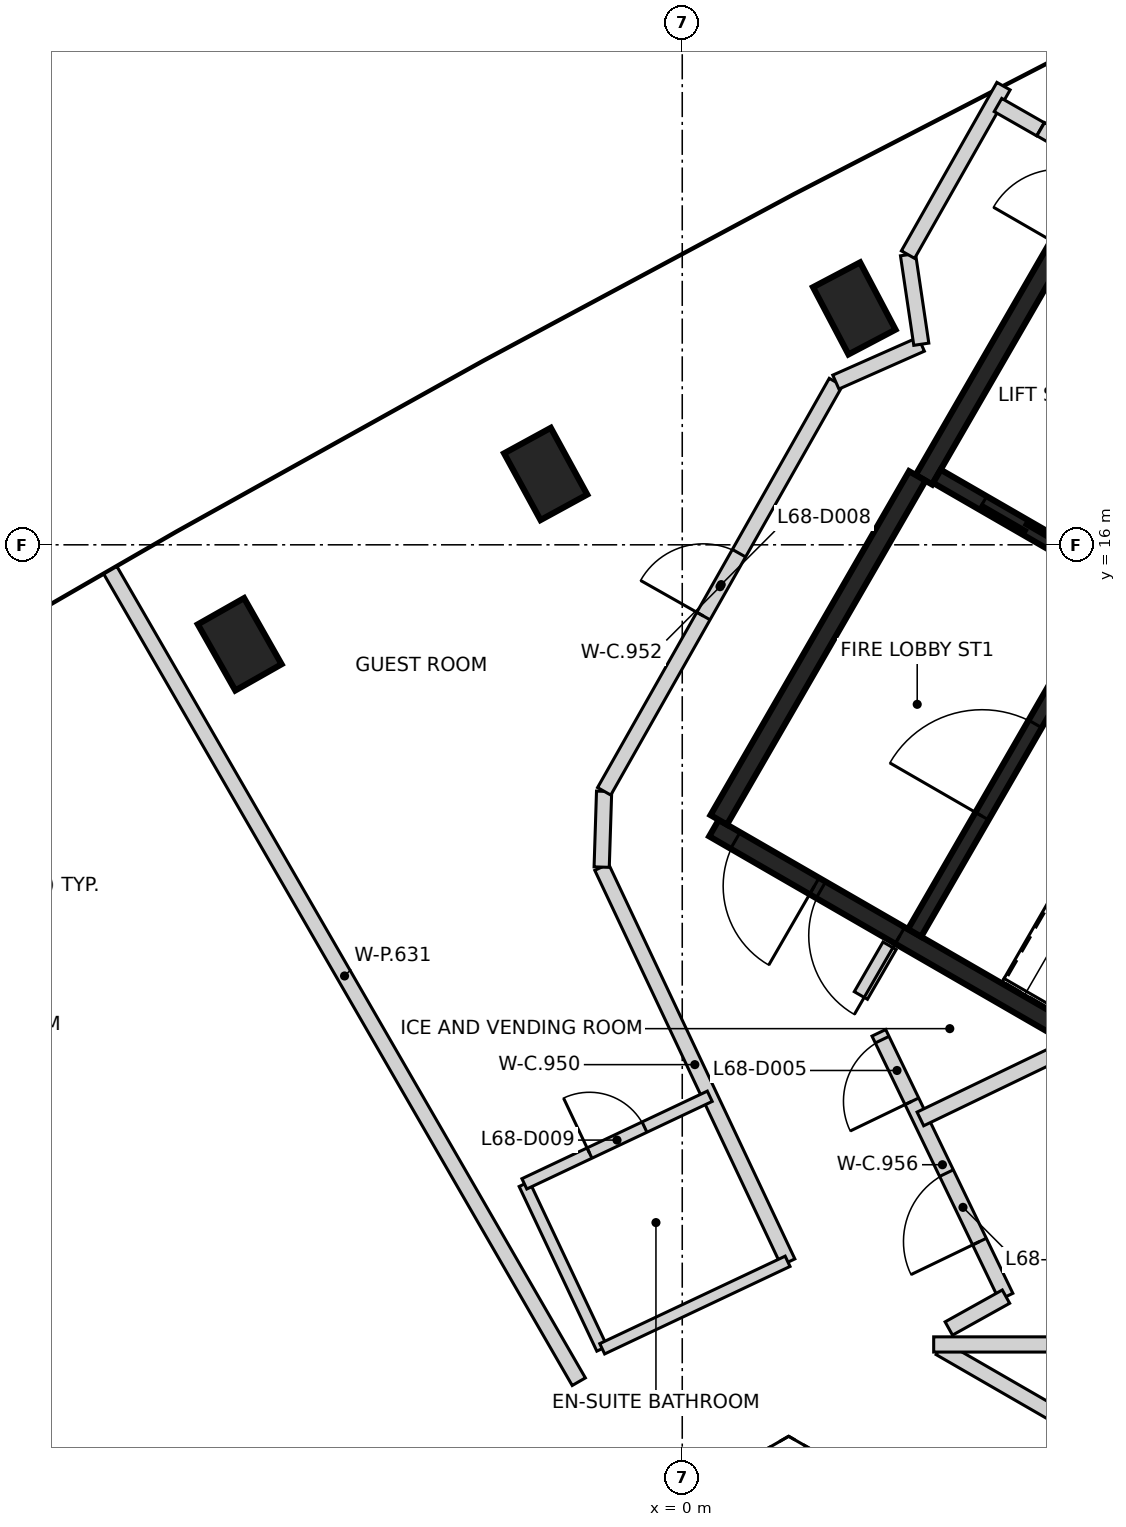
"""IFC4 building model, lengths in metres.
Left out: names, types, materials, properties, quantities, classifications, styles, units other than length and angle.
Written with IfcOpenShell. Run it as: python <this file> out.ifc"""

import sys

from ifc_helpers import new_model, si_unit, direction, frame, frame_2d, origin, origin_2d, place, context, subcontext, project, spatial, rectangle, extrude, element, fill, save


model = new_model("IFC4")
c1 = context("Model", 3, precision=1e-05, world=origin(), true_north=direction((0.0, 1.0)))
c2 = subcontext(c1, "Body", "Model", "MODEL_VIEW")
j1 = project(units=[si_unit("LENGTHUNIT", "METRE"), si_unit("PLANEANGLEUNIT", "RADIAN")], contexts=[c1])
p1 = place(None, origin())
s1 = spatial("IfcSite", under=j1, at=p1, CompositionType="ELEMENT")
p2 = place(p1, origin())
s2 = spatial("IfcBuilding", under=s1, at=p2, CompositionType="ELEMENT")
p3 = place(p2, frame((0.0, 0.0, 269.4)))
s3 = spatial("IfcBuildingStorey", under=s2, at=p3, CompositionType="ELEMENT", Elevation=269.4)
for number, where, z_axis, x_axis in (
    (1, (2.263, 19.11, -0.35), (0.0, 0.0, 1.0), (-0.466, 0.885, 0.0)),
    (2, (-1.797, 16.932, -0.35), (0.0, 0.0, 1.0), (-0.479, 0.878, 0.0)),
    (3, (-5.822, 14.691, -0.35), (0.0, 0.0, 1.0), (-0.493, 0.87, 0.0)),
):
    element("IfcColumn", number, at=place(p3, frame(where, z_axis=z_axis, x_axis=x_axis)), inside=s3, PredefinedType="COLUMN", context=c2, shape_type="SweptSolid", body=[
        extrude(rectangle(XDim=1.0, YDim=0.7, at=origin_2d()), origin(), (0.0, 0.0, 1.0), 3.6),
    ])
p4 = place(p3, frame((10.42, 6.498, 0.0), z_axis=(0.0, 0.0, 1.0), x_axis=(-0.866021906294, 0.500006057782, 0.0)))
e4 = element("IfcWall", 4, at=p4, inside=s3, PredefinedType="SHEAR", context=c2, shape_type="SweptSolid", body=[
    extrude(rectangle(XDim=11.55, YDim=0.25, at=frame_2d((5.775, 0.0))), origin(), (0.0, 0.0, 1.0), 3.25),
])
p5 = place(p4, frame((10.025, 0.0, 0.0)))
e5 = element("IfcOpeningElement", 5, at=p5, cuts=e4, PredefinedType="OPENING", context=c2, shape_type="SweptSolid", body=[
    extrude(rectangle(XDim=1.2, YDim=2.1, at=frame_2d((0.6, 1.05))), frame((0.0, 0.135, 0.0), z_axis=(0.0, -1.0, 0.0), x_axis=(1.0, 0.0, 0.0)), (0.0, 0.0, 1.0), 0.27),
])
p6 = place(p4, frame((8.725, 0.0, 0.0)))
e6 = element("IfcOpeningElement", 6, at=p6, cuts=e4, PredefinedType="OPENING", context=c2, shape_type="SweptSolid", body=[
    extrude(rectangle(XDim=1.2, YDim=2.1, at=frame_2d((0.6, 1.05))), frame((0.0, 0.135, 0.0), z_axis=(0.0, -1.0, 0.0), x_axis=(1.0, 0.0, 0.0)), (0.0, 0.0, 1.0), 0.27),
])
p7 = place(p3, frame((3.179, 16.856, 0.0), z_axis=(0.0, 0.0, 1.0), x_axis=(0.500001955336, 0.866024274868, 0.0)))
e7 = element("IfcWall", 7, at=p7, inside=s3, PredefinedType="SHEAR", context=c2, shape_type="SweptSolid", body=[
    extrude(rectangle(XDim=6.125, YDim=0.25, at=frame_2d((3.062, 0.0))), origin(), (0.0, 0.0, 1.0), 3.25),
])
p8 = place(p7, frame((3.563, 0.0, 0.0)))
e8 = element("IfcOpeningElement", 8, at=p8, cuts=e7, PredefinedType="OPENING", context=c2, shape_type="SweptSolid", body=[
    extrude(rectangle(XDim=1.0, YDim=2.1, at=frame_2d((0.5, 1.05))), frame((0.0, 0.135, 0.0), z_axis=(0.0, -1.0, 0.0), x_axis=(1.0, 0.0, 0.0)), (0.0, 0.0, 1.0), 0.27),
])
p9 = place(p3, frame((0.48, 12.381, 0.0), z_axis=(0.0, 0.0, 1.0), x_axis=(0.49999885962, 0.866026062182, 0.0)))
e9 = element("IfcWall", 9, at=p9, inside=s3, PredefinedType="SHEAR", context=c2, shape_type="SweptSolid", body=[
    extrude(rectangle(XDim=5.225, YDim=0.25, at=frame_2d((2.612, 0.0))), origin(), (0.0, 0.0, 1.0), 3.25),
])
p10 = place(p3, frame((3.057, 10.895, 0.0), z_axis=(0.0, 0.0, 1.0), x_axis=(0.500027839223, 0.866009330205, 0.0)))
e10 = element("IfcWall", 10, at=p10, inside=s3, PredefinedType="SHEAR", context=c2, shape_type="SweptSolid", body=[
    extrude(rectangle(XDim=5.098, YDim=0.2, at=frame_2d((2.549, 0.0))), origin(), (0.0, 0.0, 1.0), 3.25),
])
p11 = place(p10, frame((1.774, 0.0, 0.0)))
e11 = element("IfcOpeningElement", 11, at=p11, cuts=e10, PredefinedType="OPENING", context=c2, shape_type="SweptSolid", body=[
    extrude(rectangle(XDim=1.4, YDim=2.1, at=frame_2d((0.7, 1.05))), frame((0.0, 0.11, 0.0), z_axis=(0.0, -1.0, 0.0), x_axis=(1.0, 0.0, 0.0)), (0.0, 0.0, 1.0), 0.22),
])
p12 = place(p3, frame((5.646, 15.576, 0.0), z_axis=(0.0, 0.0, 1.0), x_axis=(-0.866018407898, 0.500012117035, 0.0)))
e12 = element("IfcWall", 12, at=p12, inside=s3, PredefinedType="SHEAR", context=c2, shape_type="SweptSolid", body=[
    extrude(rectangle(XDim=2.651, YDim=0.2, at=frame_2d((1.325, 0.0))), origin(), (0.0, 0.0, 1.0), 3.25),
])
p13 = place(p12, frame((0.652, 0.0, 0.0)))
e13 = element("IfcOpeningElement", 13, at=p13, cuts=e12, PredefinedType="OPENING", context=c2, shape_type="SweptSolid", body=[
    extrude(rectangle(XDim=1.3, YDim=2.1, at=frame_2d((0.65, 1.05))), frame((0.0, 0.11, 0.0), z_axis=(0.0, -1.0, 0.0), x_axis=(1.0, 0.0, 0.0)), (0.0, 0.0, 1.0), 0.22),
])
p14 = place(p3, frame((-1.06, 11.76, 0.0), z_axis=(0.0, 0.0, 1.0), x_axis=(0.426549824954, -0.904464066081, 0.0)))
e14 = element("IfcWall", 14, at=p14, inside=s3, PredefinedType="PARTITIONING", context=c2, shape_type="SweptSolid", body=[
    extrude(rectangle(XDim=5.747, YDim=0.2, at=frame_2d((2.873, 0.0))), origin(), (0.0, 0.0, 1.0), 3.25),
])
p15 = place(p3, frame((-1.06, 11.76, 0.0), z_axis=(0.0, 0.0, 1.0), x_axis=(0.032059906789, 0.999485949064, 0.0)))
e15 = element("IfcWall", 15, at=p15, inside=s3, PredefinedType="PARTITIONING", context=c2, shape_type="SweptSolid", body=[
    extrude(rectangle(XDim=0.998, YDim=0.2, at=frame_2d((0.499, 0.0))), origin(), (0.0, 0.0, 1.0), 3.25),
])
p16 = place(p3, frame((-1.027, 12.757, 0.0), z_axis=(0.0, 0.0, 1.0), x_axis=(0.492663063759, 0.870220147783, 0.0)))
e16 = element("IfcWall", 16, at=p16, inside=s3, PredefinedType="PARTITIONING", context=c2, shape_type="SweptSolid", body=[
    extrude(rectangle(XDim=6.187, YDim=0.2, at=frame_2d((3.094, 0.0))), origin(), (0.0, 0.0, 1.0), 3.25),
])
p17 = place(p16, frame((2.65, 0.0, 0.0)))
e17 = element("IfcOpeningElement", 17, at=p17, cuts=e16, PredefinedType="OPENING", context=c2, shape_type="SweptSolid", body=[
    extrude(rectangle(XDim=0.95, YDim=2.1, at=frame_2d((0.475, 1.05))), frame((0.0, 0.11, 0.0), z_axis=(0.0, -1.0, 0.0), x_axis=(1.0, 0.0, 0.0)), (0.0, 0.0, 1.0), 0.22),
])
p18 = place(p3, frame((2.021, 18.141, 0.0), z_axis=(0.0, 0.0, 1.0), x_axis=(0.914343087003, 0.404940389748, 0.0)))
e18 = element("IfcWall", 18, at=p18, inside=s3, PredefinedType="PARTITIONING", context=c2, shape_type="SweptSolid", body=[
    extrude(rectangle(XDim=1.229, YDim=0.2, at=frame_2d((0.615, 0.0))), origin(), (0.0, 0.0, 1.0), 3.25),
])
p19 = place(p3, frame((2.35, 10.071, 0.0), z_axis=(0.0, 0.0, 1.0), x_axis=(0.500309905322, 0.865846405916, 0.0)))
e19 = element("IfcWall", 19, at=p19, inside=s3, PredefinedType="PARTITIONING", context=c2, shape_type="SweptSolid", body=[
    extrude(rectangle(XDim=0.755, YDim=0.2, at=frame_2d((0.378, 0.0))), origin(), (0.0, 0.0, 1.0), 3.25),
])
p20 = place(p3, frame((4.26, 6.109, 0.0), z_axis=(0.0, 0.0, 1.0), x_axis=(-0.434189007872, 0.900821794498, 0.0)))
e20 = element("IfcWall", 20, at=p20, inside=s3, PredefinedType="PARTITIONING", context=c2, shape_type="SweptSolid", body=[
    extrude(rectangle(XDim=3.853, YDim=0.2, at=frame_2d((1.926, 0.0))), origin(), (0.0, 0.0, 1.0), 3.25),
])
p21 = place(p20, frame((2.853, 0.0, 0.0)))
e21 = element("IfcOpeningElement", 21, at=p21, cuts=e20, PredefinedType="OPENING", context=c2, shape_type="SweptSolid", body=[
    extrude(rectangle(XDim=0.9, YDim=2.1, at=frame_2d((0.45, 1.05))), frame((0.0, 0.11, 0.0), z_axis=(0.0, -1.0, 0.0), x_axis=(1.0, 0.0, 0.0)), (0.0, 0.0, 1.0), 0.22),
])
p22 = place(p20, frame((0.804, 0.0, 0.0)))
e22 = element("IfcOpeningElement", 22, at=p22, cuts=e20, PredefinedType="OPENING", context=c2, shape_type="SweptSolid", body=[
    extrude(rectangle(XDim=1.0, YDim=2.1, at=frame_2d((0.5, 1.05))), frame((0.0, 0.11, 0.0), z_axis=(0.0, -1.0, 0.0), x_axis=(1.0, 0.0, 0.0)), (0.0, 0.0, 1.0), 0.22),
])
p23 = place(p3, frame((2.97, 19.817, 0.0), z_axis=(0.0, 0.0, 1.0), x_axis=(0.146986994932, -0.989138424752, 0.0)))
e23 = element("IfcWall", 23, at=p23, inside=s3, PredefinedType="PARTITIONING", context=c2, shape_type="SweptSolid", body=[
    extrude(rectangle(XDim=1.191, YDim=0.2, at=frame_2d((0.595, 0.0))), origin(), (0.0, 0.0, 1.0), 2.35),
])
p24 = place(p3, frame((2.97, 19.818, 0.0), z_axis=(0.0, 0.0, 1.0), x_axis=(0.493215654548, 0.86990707441, 0.0)))
e24 = element("IfcWall", 24, at=p24, inside=s3, PredefinedType="PARTITIONING", context=c2, shape_type="SweptSolid", body=[
    extrude(rectangle(XDim=2.548, YDim=0.2, at=frame_2d((1.274, 0.0))), origin(), (0.0, 0.0, 1.0), 3.25),
])
p25 = place(p3, frame((3.39, 5.433, 0.0), z_axis=(0.0, 0.0, 1.0), x_axis=(0.866117799835, -0.499839931186, 0.0)))
e25 = element("IfcWall", 25, at=p25, inside=s3, PredefinedType="PARTITIONING", context=c2, shape_type="SweptSolid", body=[
    extrude(rectangle(XDim=1.859, YDim=0.2, at=frame_2d((0.929, 0.0))), origin(), (0.0, 0.0, 1.0), 3.25),
])
p26 = place(p3, frame((3.507, 5.69, 0.0), z_axis=(0.0, 0.0, 1.0), x_axis=(0.873567976284, 0.486702158215, 0.0)))
e26 = element("IfcWall", 26, at=p26, inside=s3, PredefinedType="PARTITIONING", context=c2, shape_type="SweptSolid", body=[
    extrude(rectangle(XDim=0.861, YDim=0.2, at=frame_2d((0.43, 0.0))), origin(), (0.0, 0.0, 1.0), 3.25),
])
p27 = place(p3, frame((4.154, 21.786, 0.0), z_axis=(0.0, 0.0, 1.0), x_axis=(0.868196374619, -0.496220772539, 0.0)))
e27 = element("IfcWall", 27, at=p27, inside=s3, PredefinedType="PARTITIONING", context=c2, shape_type="SweptSolid", body=[
    extrude(rectangle(XDim=0.643, YDim=0.2, at=frame_2d((0.321, 0.0))), origin(), (0.0, 0.0, 1.0), 3.25),
])
p28 = place(p3, frame((4.716, 21.468, 0.0), z_axis=(0.0, 0.0, 1.0), x_axis=(0.865912682783, -0.500195187698, 0.0)))
e28 = element("IfcWall", 28, at=p28, inside=s3, PredefinedType="PARTITIONING", context=c2, shape_type="SweptSolid", body=[
    extrude(rectangle(XDim=0.79, YDim=0.2, at=frame_2d((0.395, 0.0))), origin(), (0.0, 0.0, 1.0), 3.25),
])
p29 = place(p3, frame((-7.524, 15.666, 0.0), z_axis=(0.0, 0.0, 1.0), x_axis=(0.499979611936, -0.866037174519, 0.0)))
e29 = element("IfcWall", 29, at=p29, inside=s3, PredefinedType="PARTITIONING", context=c2, shape_type="SweptSolid", body=[
    extrude(rectangle(XDim=12.327, YDim=0.2, at=frame_2d((6.164, 0.0))), origin(), (0.0, 0.0, 1.0), 2.35),
])
p30 = place(p3, frame((3.133, 8.447, 0.0), z_axis=(0.0, 0.0, 1.0), x_axis=(0.900981876458, 0.433856725538, 0.0)))
e30 = element("IfcWall", 30, at=p30, inside=s3, PredefinedType="PARTITIONING", context=c2, shape_type="SweptSolid", body=[
    extrude(rectangle(XDim=2.143, YDim=0.2, at=frame_2d((1.071, 0.0))), origin(), (0.0, 0.0, 1.0), 3.25),
])
p31 = place(p3, frame((3.308, 5.48, 0.0), z_axis=(0.0, 0.0, 1.0), x_axis=(1.0, 0.0, 0.0)))
e31 = element("IfcWall", 31, at=p31, inside=s3, PredefinedType="PARTITIONING", context=c2, shape_type="SweptSolid", body=[
    extrude(rectangle(XDim=13.971, YDim=0.2, at=frame_2d((6.986, 0.0))), origin(), (0.0, 0.0, 1.0), 2.35),
])
p32 = place(p3, frame((-2.078, 7.59, 0.0), z_axis=(0.0, 0.0, 1.0), x_axis=(0.426709924428, -0.904388545037, 0.0)))
e32 = element("IfcWall", 32, at=p32, inside=s3, PredefinedType="PARTITIONING", context=c2, shape_type="SweptSolid", body=[
    extrude(rectangle(XDim=2.395, YDim=0.15, at=frame_2d((1.198, 0.0))), origin(), (0.0, 0.0, 1.0), 3.25),
])
p33 = place(p3, frame((-2.077, 7.593, 0.0), z_axis=(0.0, 0.0, 1.0), x_axis=(0.904196218291, 0.427117312724, 0.0)))
e33 = element("IfcWall", 33, at=p33, inside=s3, PredefinedType="PARTITIONING", context=c2, shape_type="SweptSolid", body=[
    extrude(rectangle(XDim=2.697, YDim=0.15, at=frame_2d((1.349, 0.0))), origin(), (0.0, 0.0, 1.0), 3.25),
])
p34 = place(p33, frame((0.948, 0.0, 0.0)))
e34 = element("IfcOpeningElement", 34, at=p34, cuts=e33, PredefinedType="OPENING", context=c2, shape_type="SweptSolid", body=[
    extrude(rectangle(XDim=0.8, YDim=2.1, at=frame_2d((0.4, 1.05))), frame((0.0, 0.085, 0.0), z_axis=(0.0, -1.0, 0.0), x_axis=(1.0, 0.0, 0.0)), (0.0, 0.0, 1.0), 0.17),
])
p35 = place(p3, frame((-1.053, 5.423, 0.0), z_axis=(0.0, 0.0, 1.0), x_axis=(0.904370950432, 0.426747213247, 0.0)))
e35 = element("IfcWall", 35, at=p35, inside=s3, PredefinedType="PARTITIONING", context=c2, shape_type="SweptSolid", body=[
    extrude(rectangle(XDim=2.697, YDim=0.15, at=frame_2d((1.348, 0.0))), origin(), (0.0, 0.0, 1.0), 3.25),
])
p36 = place(p13, origin())
e36 = element("IfcDoor", 36, at=p36, inside=s3, OperationType="SLIDING_TO_LEFT", PredefinedType="DOOR", context=c2, shape_type="SweptSolid", body=[
    extrude(rectangle(XDim=1.3, YDim=2.1, at=frame_2d((0.65, 1.05))), frame((0.0, 0.025, 0.0), z_axis=(0.0, -1.0, 0.0), x_axis=(1.0, 0.0, 0.0)), (0.0, 0.0, 1.0), 0.05),
])
fill(e13, e36)
p37 = place(p5, origin())
e37 = element("IfcDoor", 37, at=p37, inside=s3, OperationType="SINGLE_SWING_LEFT", PredefinedType="DOOR", context=c2, shape_type="SweptSolid", body=[
    extrude(rectangle(XDim=1.2, YDim=2.1, at=frame_2d((0.6, 1.05))), frame((0.0, 0.025, 0.0), z_axis=(0.0, -1.0, 0.0), x_axis=(1.0, 0.0, 0.0)), (0.0, 0.0, 1.0), 0.05),
])
fill(e5, e37)
p38 = place(p6, origin())
e38 = element("IfcDoor", 38, at=p38, inside=s3, OperationType="SINGLE_SWING_RIGHT", PredefinedType="DOOR", context=c2, shape_type="SweptSolid", body=[
    extrude(rectangle(XDim=1.2, YDim=2.1, at=frame_2d((0.6, 1.05))), frame((0.0, 0.025, 0.0), z_axis=(0.0, -1.0, 0.0), x_axis=(1.0, 0.0, 0.0)), (0.0, 0.0, 1.0), 0.05),
])
fill(e6, e38)
p39 = place(p11, origin())
e39 = element("IfcDoor", 39, at=p39, inside=s3, OperationType="SINGLE_SWING_LEFT", PredefinedType="DOOR", context=c2, shape_type="SweptSolid", body=[
    extrude(rectangle(XDim=1.4, YDim=2.1, at=frame_2d((0.7, 1.05))), frame((0.0, 0.025, 0.0), z_axis=(0.0, -1.0, 0.0), x_axis=(1.0, 0.0, 0.0)), (0.0, 0.0, 1.0), 0.05),
])
fill(e11, e39)
p40 = place(p21, origin())
e40 = element("IfcDoor", 40, at=p40, inside=s3, OperationType="SINGLE_SWING_LEFT", PredefinedType="DOOR", context=c2, shape_type="SweptSolid", body=[
    extrude(rectangle(XDim=0.9, YDim=2.1, at=frame_2d((0.45, 1.05))), frame((0.0, 0.025, 0.0), z_axis=(0.0, -1.0, 0.0), x_axis=(1.0, 0.0, 0.0)), (0.0, 0.0, 1.0), 0.05),
])
fill(e21, e40)
p41 = place(p22, origin())
e41 = element("IfcDoor", 41, at=p41, inside=s3, OperationType="SINGLE_SWING_LEFT", PredefinedType="DOOR", context=c2, shape_type="SweptSolid", body=[
    extrude(rectangle(XDim=1.0, YDim=2.1, at=frame_2d((0.5, 1.05))), frame((0.0, 0.025, 0.0), z_axis=(0.0, -1.0, 0.0), x_axis=(1.0, 0.0, 0.0)), (0.0, 0.0, 1.0), 0.05),
])
fill(e22, e41)
p42 = place(p17, origin())
e42 = element("IfcDoor", 42, at=p42, inside=s3, OperationType="SINGLE_SWING_LEFT", PredefinedType="DOOR", context=c2, shape_type="SweptSolid", body=[
    extrude(rectangle(XDim=0.95, YDim=2.1, at=frame_2d((0.475, 1.05))), frame((0.0, 0.025, 0.0), z_axis=(0.0, -1.0, 0.0), x_axis=(1.0, 0.0, 0.0)), (0.0, 0.0, 1.0), 0.05),
])
fill(e17, e42)
p43 = place(p34, origin())
e43 = element("IfcDoor", 43, at=p43, inside=s3, OperationType="SINGLE_SWING_LEFT", PredefinedType="DOOR", context=c2, shape_type="SweptSolid", body=[
    extrude(rectangle(XDim=0.8, YDim=2.1, at=frame_2d((0.4, 1.05))), frame((0.0, 0.025, 0.0), z_axis=(0.0, -1.0, 0.0), x_axis=(1.0, 0.0, 0.0)), (0.0, 0.0, 1.0), 0.05),
])
fill(e34, e43)
save(model, sys.argv[1])
